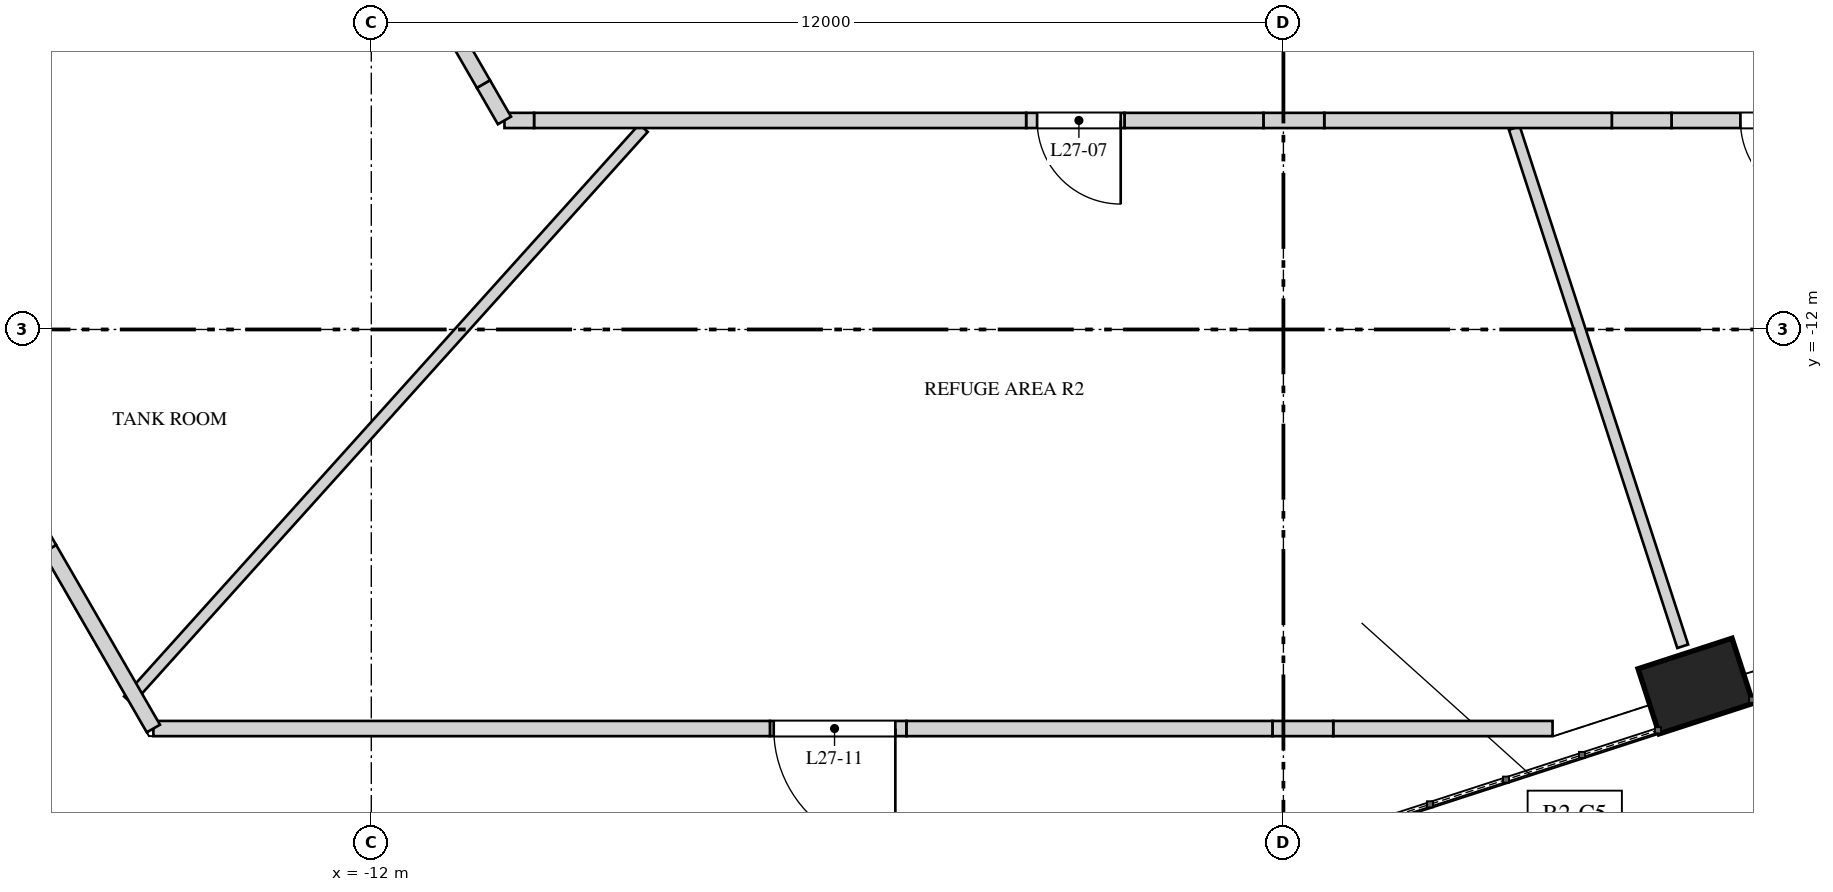
"""IFC4 building model, lengths in metres.
Left out: names, types, materials, properties, quantities, classifications, styles, units other than length and angle.
Written with IfcOpenShell. Run it as: python <this file> out.ifc"""

import sys

from ifc_helpers import new_model, si_unit, direction, frame, frame_2d, origin, origin_2d, place, context, subcontext, project, spatial, polyline, rectangle, outline, extrude, element, fill, save


model = new_model("IFC4")
c1 = context("Model", 3, precision=1e-05, world=origin(), true_north=direction((0.0, 1.0)))
c2 = subcontext(c1, "Body", "Model", "MODEL_VIEW")
j1 = project(units=[si_unit("LENGTHUNIT", "METRE"), si_unit("PLANEANGLEUNIT", "RADIAN")], contexts=[c1])
p1 = place(None, origin())
s1 = spatial("IfcSite", under=j1, at=p1, CompositionType="ELEMENT")
p2 = place(p1, origin())
s2 = spatial("IfcBuilding", under=s1, at=p2, CompositionType="ELEMENT")
p3 = place(p2, frame((0.0, 0.0, 120.4)))
s3 = spatial("IfcBuildingStorey", under=s2, at=p3, CompositionType="ELEMENT", Elevation=120.4)
p4 = place(p3, frame((5.423, -16.691, 0.0), z_axis=(0.0, 0.0, 1.0), x_axis=(0.951056516295, 0.309016994375, 0.0)))
e1 = element("IfcColumn", 1, at=p4, inside=s3, PredefinedType="COLUMN", context=c2, shape_type="SweptSolid", body=[
    extrude(rectangle(XDim=1.3, YDim=0.9, at=origin_2d()), origin(), (0.0, 0.0, 1.0), 2.864),
])
p5 = place(p3, frame((-8.419, -9.35, 0.0), z_axis=(0.0, 0.0, 1.0), x_axis=(-0.669143140435, -0.743133539553, 0.0)))
e2 = element("IfcWall", 2, at=p5, inside=s3, PredefinedType="PARTITIONING", context=c2, shape_type="SweptSolid", body=[
    extrude(rectangle(XDim=10.13, YDim=0.15, at=frame_2d((5.065, 0.0))), origin(), (0.0, 0.0, 1.0), 4.85),
])
p6 = place(p3, frame((3.038, -9.35, 0.0), z_axis=(0.0, 0.0, 1.0), x_axis=(0.308995202085, -0.951063596763, 0.0)))
e3 = element("IfcWall", 3, at=p6, inside=s3, PredefinedType="PARTITIONING", context=c2, shape_type="SweptSolid", body=[
    extrude(rectangle(XDim=7.169, YDim=0.15, at=frame_2d((3.584, 0.0))), origin(), (0.0, 0.0, 1.0), 4.85),
])
p7 = place(p3, frame((10.248, -9.25, 0.0), z_axis=(0.0, 0.0, 1.0), x_axis=(-1.0, 0.0, 0.0)))
e4 = element("IfcWall", 4, at=p7, inside=s3, PredefinedType="SOLIDWALL", context=c2, shape_type="SweptSolid", body=[
    extrude(rectangle(XDim=5.142, YDim=0.2, at=frame_2d((2.571, 0.0))), origin(), (0.0, 0.0, 1.0), 4.85),
])
p8 = place(p7, frame((3.136, 0.0, 0.0)))
e5 = element("IfcOpeningElement", 5, at=p8, cuts=e4, PredefinedType="OPENING", context=c2, shape_type="SweptSolid", body=[
    extrude(rectangle(XDim=1.1, YDim=2.2, at=frame_2d((0.55, 1.1))), frame((0.0, 0.11, 0.0), z_axis=(0.0, -1.0, 0.0), x_axis=(1.0, 0.0, 0.0)), (0.0, 0.0, 1.0), 0.22),
])
p9 = place(p3, frame((5.106, -9.25, 0.0), z_axis=(0.0, 0.0, 1.0), x_axis=(-1.0, 0.0, 0.0)))
e6 = element("IfcWall", 6, at=p9, inside=s3, PredefinedType="SOLIDWALL", context=c2, shape_type="SweptSolid", body=[
    extrude(rectangle(XDim=0.786, YDim=0.2, at=frame_2d((0.393, 0.0))), origin(), (0.0, 0.0, 1.0), 4.15),
])
p10 = place(p3, frame((4.32, -9.25, 0.0), z_axis=(0.0, 0.0, 1.0), x_axis=(-1.0, 0.0, 0.0)))
e7 = element("IfcWall", 7, at=p10, inside=s3, PredefinedType="SOLIDWALL", context=c2, shape_type="SweptSolid", body=[
    extrude(rectangle(XDim=3.783, YDim=0.2, at=frame_2d((1.892, 0.0))), origin(), (0.0, 0.0, 1.0), 4.85),
])
p11 = place(p3, frame((0.537, -9.25, 0.0), z_axis=(0.0, 0.0, 1.0), x_axis=(-1.0, 0.0, 0.0)))
e8 = element("IfcWall", 8, at=p11, inside=s3, PredefinedType="SOLIDWALL", context=c2, shape_type="SweptSolid", body=[
    extrude(rectangle(XDim=0.8, YDim=0.2, at=frame_2d((0.4, 0.0))), origin(), (0.0, 0.0, 1.0), 3.95),
])
p12 = place(p3, frame((-0.263, -9.25, 0.0), z_axis=(0.0, 0.0, 1.0), x_axis=(-1.0, 0.0, 0.0)))
e9 = element("IfcWall", 9, at=p12, inside=s3, PredefinedType="SOLIDWALL", context=c2, shape_type="SweptSolid", body=[
    extrude(rectangle(XDim=1.828, YDim=0.2, at=frame_2d((0.914, 0.0))), origin(), (0.0, 0.0, 1.0), 4.85),
])
p13 = place(p3, frame((-2.091, -9.25, 0.0), z_axis=(0.0, 0.0, 1.0), x_axis=(-1.0, 0.0, 0.0)))
e10 = element("IfcWall", 10, at=p13, inside=s3, PredefinedType="SOLIDWALL", context=c2, shape_type="SweptSolid", body=[
    extrude(outline(polyline([(0.0, 0.0), (1.294, 0.0), (1.294, 3.75), (0.351, 3.75), (0.351, 4.85), (0.0, 4.85), (0.0, 0.0)])), frame((0.0, 0.1, 0.0), z_axis=(0.0, -1.0, 0.0), x_axis=(1.0, 0.0, 0.0)), (0.0, 0.0, 1.0), 0.2),
])
p14 = place(p13, frame((0.05, 0.0, 0.0)))
e11 = element("IfcOpeningElement", 11, at=p14, cuts=e10, PredefinedType="OPENING", context=c2, shape_type="SweptSolid", body=[
    extrude(rectangle(XDim=1.1, YDim=2.2, at=frame_2d((0.55, 1.1))), frame((0.0, 0.11, 0.0), z_axis=(0.0, -1.0, 0.0), x_axis=(1.0, 0.0, 0.0)), (0.0, 0.0, 1.0), 0.22),
])
p15 = place(p3, frame((-3.385, -9.25, 0.0), z_axis=(0.0, 0.0, 1.0), x_axis=(-1.0, 0.0, 0.0)))
e12 = element("IfcWall", 12, at=p15, inside=s3, PredefinedType="SOLIDWALL", context=c2, shape_type="SweptSolid", body=[
    extrude(rectangle(XDim=6.474, YDim=0.2, at=frame_2d((3.237, 0.0))), origin(), (0.0, 0.0, 1.0), 4.85),
])
p16 = place(p3, frame((-9.859, -9.25, 0.0), z_axis=(0.0, 0.0, 1.0), x_axis=(-1.0, 0.0, 0.0)))
e13 = element("IfcWall", 13, at=p16, inside=s3, PredefinedType="SOLIDWALL", context=c2, shape_type="SweptSolid", body=[
    extrude(rectangle(XDim=0.389, YDim=0.2, at=frame_2d((0.195, 0.0))), origin(), (0.0, 0.0, 1.0), 3.95),
])
p17 = place(p3, frame((-10.248, -9.25, 0.0), z_axis=(0.0, 0.0, 1.0), x_axis=(-0.499887958344, 0.866090081402, 0.0)))
e14 = element("IfcWall", 14, at=p17, inside=s3, PredefinedType="SOLIDWALL", context=c2, shape_type="SweptSolid", body=[
    extrude(rectangle(XDim=0.553, YDim=0.2, at=frame_2d((0.277, 0.0))), origin(), (0.0, 0.0, 1.0), 3.95),
])
p18 = place(p3, frame((-10.525, -8.771, 0.0), z_axis=(0.0, 0.0, 1.0), x_axis=(-0.500031425827, 0.866007259314, 0.0)))
e15 = element("IfcWall", 15, at=p18, inside=s3, PredefinedType="SOLIDWALL", context=c2, shape_type="SweptSolid", body=[
    extrude(rectangle(XDim=3.602, YDim=0.2, at=frame_2d((1.801, 0.0))), origin(), (0.0, 0.0, 1.0), 4.85),
])
p19 = place(p18, frame((1.783, 0.0, 0.0)))
e16 = element("IfcOpeningElement", 16, at=p19, cuts=e15, PredefinedType="OPENING", context=c2, shape_type="SweptSolid", body=[
    extrude(rectangle(XDim=1.1, YDim=2.2, at=frame_2d((0.55, 1.1))), frame((0.0, 0.11, 0.0), z_axis=(0.0, -1.0, 0.0), x_axis=(1.0, 0.0, 0.0)), (0.0, 0.0, 1.0), 0.22),
])
p20 = place(p3, frame((3.541, -17.25, 0.0), z_axis=(0.0, 0.0, 1.0), x_axis=(-1.0, 0.0, 0.0)))
e17 = element("IfcWall", 17, at=p20, inside=s3, PredefinedType="SOLIDWALL", context=c2, shape_type="SweptSolid", body=[
    extrude(rectangle(XDim=2.886, YDim=0.2, at=frame_2d((1.443, 0.0))), origin(), (0.0, 0.0, 1.0), 4.85),
])
p21 = place(p3, frame((0.656, -17.25, 0.0), z_axis=(0.0, 0.0, 1.0), x_axis=(-1.0, 0.0, 0.0)))
e18 = element("IfcWall", 18, at=p21, inside=s3, PredefinedType="SOLIDWALL", context=c2, shape_type="SweptSolid", body=[
    extrude(rectangle(XDim=0.8, YDim=0.2, at=frame_2d((0.4, 0.0))), origin(), (0.0, 0.0, 1.0), 3.95),
])
p22 = place(p3, frame((-0.145, -17.25, 0.0), z_axis=(0.0, 0.0, 1.0), x_axis=(-1.0, 0.0, 0.0)))
e19 = element("IfcWall", 19, at=p22, inside=s3, PredefinedType="SOLIDWALL", context=c2, shape_type="SweptSolid", body=[
    extrude(rectangle(XDim=4.816, YDim=0.2, at=frame_2d((2.408, 0.0))), origin(), (0.0, 0.0, 1.0), 4.85),
])
p23 = place(p3, frame((-4.96, -17.25, 0.0), z_axis=(0.0, 0.0, 1.0), x_axis=(-1.0, 0.0, 0.0)))
e20 = element("IfcWall", 20, at=p23, inside=s3, PredefinedType="SOLIDWALL", context=c2, shape_type="SweptSolid", body=[
    extrude(outline(polyline([(0.0, 0.0), (1.795, 0.0), (1.795, 4.85), (0.944, 4.85), (0.944, 3.75), (0.0, 3.75), (0.0, 0.0)])), frame((0.0, 0.1, 0.0), z_axis=(0.0, -1.0, 0.0), x_axis=(1.0, 0.0, 0.0)), (0.0, 0.0, 1.0), 0.2),
])
p24 = place(p23, frame((0.145, 0.0, 0.0)))
e21 = element("IfcOpeningElement", 21, at=p24, cuts=e20, PredefinedType="OPENING", context=c2, shape_type="SweptSolid", body=[
    extrude(rectangle(XDim=1.6, YDim=2.3, at=frame_2d((0.8, 1.15))), frame((0.0, 0.11, 0.0), z_axis=(0.0, -1.0, 0.0), x_axis=(1.0, 0.0, 0.0)), (0.0, 0.0, 1.0), 0.22),
])
p25 = place(p3, frame((-6.756, -17.25, 0.0), z_axis=(0.0, 0.0, 1.0), x_axis=(-1.0, 0.0, 0.0)))
e22 = element("IfcWall", 22, at=p25, inside=s3, PredefinedType="SOLIDWALL", context=c2, shape_type="SweptSolid", body=[
    extrude(rectangle(XDim=8.111, YDim=0.2, at=frame_2d((4.056, 0.0))), origin(), (0.0, 0.0, 1.0), 4.85),
])
p26 = place(p3, frame((-14.867, -17.25, 0.0), z_axis=(0.0, 0.0, 1.0), x_axis=(-0.500042275419, 0.866000994684, 0.0)))
e23 = element("IfcWall", 23, at=p26, inside=s3, PredefinedType="SOLIDWALL", context=c2, shape_type="SweptSolid", body=[
    extrude(rectangle(XDim=2.731, YDim=0.2, at=frame_2d((1.366, 0.0))), origin(), (0.0, 0.0, 1.0), 4.85),
])
p27 = place(p3, frame((-16.232, -14.885, 0.0), z_axis=(0.0, 0.0, 1.0), x_axis=(-0.499903734186, 0.866080975745, 0.0)))
e24 = element("IfcWall", 24, at=p27, inside=s3, PredefinedType="SOLIDWALL", context=c2, shape_type="SweptSolid", body=[
    extrude(rectangle(XDim=0.816, YDim=0.2, at=frame_2d((0.408, 0.0))), origin(), (0.0, 0.0, 1.0), 3.95),
])
p28 = place(p14, origin())
e25 = element("IfcDoor", 25, at=p28, inside=s3, OperationType="SINGLE_SWING_LEFT", PredefinedType="DOOR", context=c2, shape_type="SweptSolid", body=[
    extrude(rectangle(XDim=1.1, YDim=2.2, at=frame_2d((0.55, 1.1))), frame((0.0, 0.025, 0.0), z_axis=(0.0, -1.0, 0.0), x_axis=(1.0, 0.0, 0.0)), (0.0, 0.0, 1.0), 0.05),
])
fill(e11, e25)
p29 = place(p8, origin())
e26 = element("IfcDoor", 26, at=p29, inside=s3, OperationType="SINGLE_SWING_RIGHT", PredefinedType="DOOR", context=c2, shape_type="SweptSolid", body=[
    extrude(rectangle(XDim=1.1, YDim=2.2, at=frame_2d((0.55, 1.1))), frame((0.0, 0.025, 0.0), z_axis=(0.0, -1.0, 0.0), x_axis=(1.0, 0.0, 0.0)), (0.0, 0.0, 1.0), 0.05),
])
fill(e5, e26)
p30 = place(p24, origin())
e27 = element("IfcDoor", 27, at=p30, inside=s3, OperationType="DOUBLE_DOOR_SINGLE_SWING", PredefinedType="DOOR", context=c2, shape_type="SweptSolid", body=[
    extrude(rectangle(XDim=1.6, YDim=2.3, at=frame_2d((0.8, 1.15))), frame((0.0, 0.025, 0.0), z_axis=(0.0, -1.0, 0.0), x_axis=(1.0, 0.0, 0.0)), (0.0, 0.0, 1.0), 0.05),
])
fill(e21, e27)
save(model, sys.argv[1])
